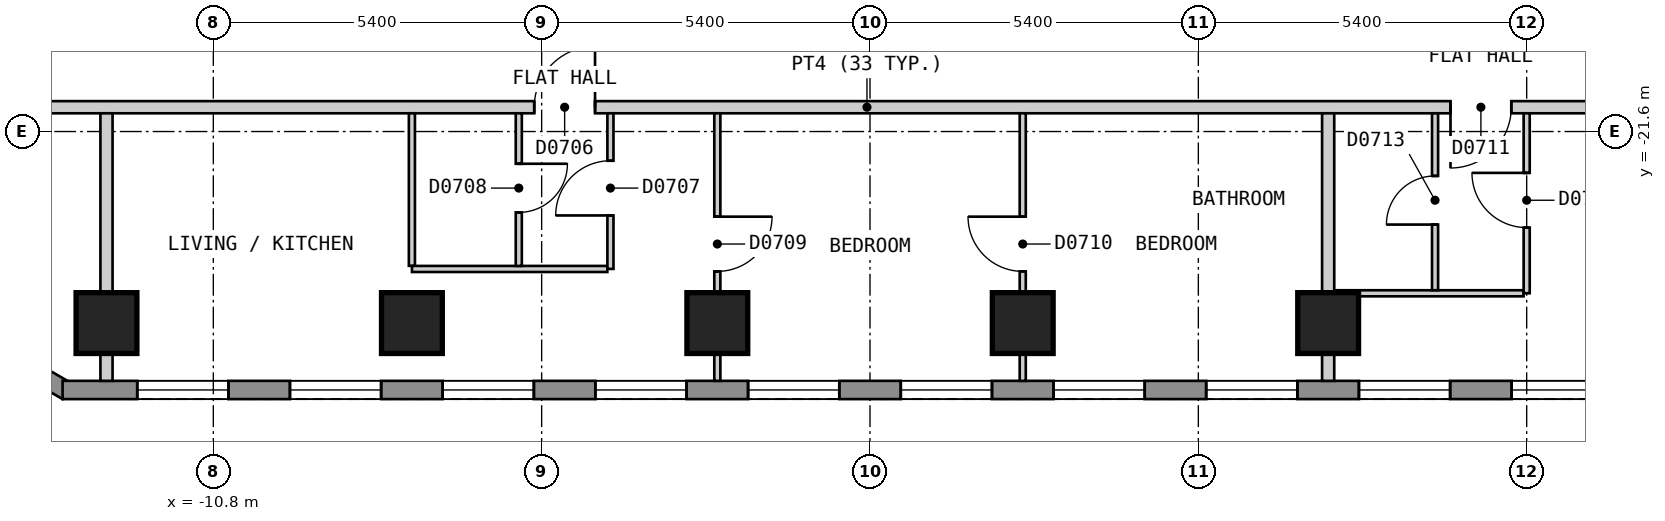
"""IFC4 building model, lengths in metres.
Left out: names, types, materials, properties, quantities, classifications, styles, units other than length and angle.
Written with IfcOpenShell. Run it as: python <this file> out.ifc"""

import sys

from ifc_helpers import new_model, si_unit, direction, frame, frame_2d, origin, origin_2d, place, context, subcontext, project, spatial, polyline, rectangle, outline, extrude, element, fill, save


model = new_model("IFC4")
c1 = context("Model", 3, precision=1e-05, world=origin(), true_north=direction((0.0, 1.0)))
c2 = subcontext(c1, "Body", "Model", "MODEL_VIEW")
j1 = project(units=[si_unit("LENGTHUNIT", "METRE"), si_unit("PLANEANGLEUNIT", "RADIAN")], contexts=[c1])
p1 = place(None, origin())
s1 = spatial("IfcSite", under=j1, at=p1, CompositionType="ELEMENT")
p2 = place(p1, origin())
s2 = spatial("IfcBuilding", under=s1, at=p2, CompositionType="ELEMENT")
p3 = place(p2, frame((0.0, 0.0, 105.0)))
s3 = spatial("IfcBuildingStorey", under=s2, at=p3, CompositionType="ELEMENT", Elevation=105.0)
for number, where, z_axis, x_axis in (
    (1, (-12.557, -24.75, 0.0), (0.0, 0.0, 1.0), (1.0, 0.0, 0.0)),
    (2, (-7.534, -24.75, 0.0), (0.0, 0.0, 1.0), (1.0, 0.0, 0.0)),
    (3, (-2.511, -24.75, 0.0), (0.0, 0.0, 1.0), (1.0, 0.0, 0.0)),
    (4, (2.512, -24.75, 0.0), (0.0, 0.0, 1.0), (1.0, 0.0, 0.0)),
    (5, (7.535, -24.75, 0.0), (0.0, 0.0, 1.0), (1.0, 0.0, 0.0)),
):
    element("IfcColumn", number, at=place(p3, frame(where, z_axis=z_axis, x_axis=x_axis)), inside=s3, PredefinedType="COLUMN", context=c2, shape_type="SweptSolid", body=[
        extrude(rectangle(XDim=1.0, YDim=1.0, at=origin_2d()), origin(), (0.0, 0.0, 1.0), 3.0),
    ])
p4 = place(p3, frame((-17.534, -23.37, 0.0), z_axis=(0.0, 0.0, 1.0), x_axis=(0.866010750942, -0.50002537861, 0.0)))
e6 = element("IfcWall", 6, at=p4, inside=s3, PredefinedType="SOLIDWALL", context=c2, shape_type="SweptSolid", body=[
    extrude(outline(polyline([(0.0, -0.15), (5.0, -0.15), (4.919, 0.15), (0.08, 0.15), (0.0, -0.15)])), origin(), (0.0, 0.0, 1.0), 2.6),
])
p5 = place(p4, frame((0.65, 0.0, 0.15)))
e7 = element("IfcOpeningElement", 7, at=p5, cuts=e6, PredefinedType="OPENING", context=c2, shape_type="SweptSolid", body=[
    extrude(rectangle(XDim=1.2, YDim=2.1, at=frame_2d((0.6, 1.05))), frame((0.0, 0.16, 0.0), z_axis=(0.0, -1.0, 0.0), x_axis=(1.0, 0.0, 0.0)), (0.0, 0.0, 1.0), 0.32),
])
p6 = place(p4, frame((3.15, 0.0, 0.15)))
e8 = element("IfcOpeningElement", 8, at=p6, cuts=e6, PredefinedType="OPENING", context=c2, shape_type="SweptSolid", body=[
    extrude(rectangle(XDim=1.2, YDim=2.1, at=frame_2d((0.6, 1.05))), frame((0.0, 0.16, 0.0), z_axis=(0.0, -1.0, 0.0), x_axis=(1.0, 0.0, 0.0)), (0.0, 0.0, 1.0), 0.32),
])
p7 = place(p3, frame((-13.279, -25.85, 0.0), z_axis=(0.0, 0.0, 1.0), x_axis=(1.0, 0.0, 0.0)))
e9 = element("IfcWall", 9, at=p7, inside=s3, PredefinedType="SOLIDWALL", context=c2, shape_type="SweptSolid", body=[
    extrude(outline(polyline([(0.0, -0.15), (26.558, -0.15), (26.478, 0.15), (0.08, 0.15), (0.0, -0.15)])), origin(), (0.0, 0.0, 1.0), 2.6),
])
p8 = place(p7, frame((1.228, 0.0, 0.15)))
e10 = element("IfcOpeningElement", 10, at=p8, cuts=e9, PredefinedType="OPENING", context=c2, shape_type="SweptSolid", body=[
    extrude(rectangle(XDim=1.5, YDim=2.1, at=frame_2d((0.75, 1.05))), frame((0.0, 0.16, 0.0), z_axis=(0.0, -1.0, 0.0), x_axis=(1.0, 0.0, 0.0)), (0.0, 0.0, 1.0), 0.32),
])
p9 = place(p7, frame((3.739, 0.0, 0.15)))
e11 = element("IfcOpeningElement", 11, at=p9, cuts=e9, PredefinedType="OPENING", context=c2, shape_type="SweptSolid", body=[
    extrude(rectangle(XDim=1.5, YDim=2.1, at=frame_2d((0.75, 1.05))), frame((0.0, 0.16, 0.0), z_axis=(0.0, -1.0, 0.0), x_axis=(1.0, 0.0, 0.0)), (0.0, 0.0, 1.0), 0.32),
])
p10 = place(p7, frame((6.251, 0.0, 0.15)))
e12 = element("IfcOpeningElement", 12, at=p10, cuts=e9, PredefinedType="OPENING", context=c2, shape_type="SweptSolid", body=[
    extrude(rectangle(XDim=1.5, YDim=2.1, at=frame_2d((0.75, 1.05))), frame((0.0, 0.16, 0.0), z_axis=(0.0, -1.0, 0.0), x_axis=(1.0, 0.0, 0.0)), (0.0, 0.0, 1.0), 0.32),
])
p11 = place(p7, frame((8.762, 0.0, 0.15)))
e13 = element("IfcOpeningElement", 13, at=p11, cuts=e9, PredefinedType="OPENING", context=c2, shape_type="SweptSolid", body=[
    extrude(rectangle(XDim=1.5, YDim=2.1, at=frame_2d((0.75, 1.05))), frame((0.0, 0.16, 0.0), z_axis=(0.0, -1.0, 0.0), x_axis=(1.0, 0.0, 0.0)), (0.0, 0.0, 1.0), 0.32),
])
p12 = place(p7, frame((11.274, 0.0, 0.15)))
e14 = element("IfcOpeningElement", 14, at=p12, cuts=e9, PredefinedType="OPENING", context=c2, shape_type="SweptSolid", body=[
    extrude(rectangle(XDim=1.5, YDim=2.1, at=frame_2d((0.75, 1.05))), frame((0.0, 0.16, 0.0), z_axis=(0.0, -1.0, 0.0), x_axis=(1.0, 0.0, 0.0)), (0.0, 0.0, 1.0), 0.32),
])
p13 = place(p7, frame((13.785, 0.0, 0.15)))
e15 = element("IfcOpeningElement", 15, at=p13, cuts=e9, PredefinedType="OPENING", context=c2, shape_type="SweptSolid", body=[
    extrude(rectangle(XDim=1.5, YDim=2.1, at=frame_2d((0.75, 1.05))), frame((0.0, 0.16, 0.0), z_axis=(0.0, -1.0, 0.0), x_axis=(1.0, 0.0, 0.0)), (0.0, 0.0, 1.0), 0.32),
])
p14 = place(p7, frame((16.297, 0.0, 0.15)))
e16 = element("IfcOpeningElement", 16, at=p14, cuts=e9, PredefinedType="OPENING", context=c2, shape_type="SweptSolid", body=[
    extrude(rectangle(XDim=1.5, YDim=2.1, at=frame_2d((0.75, 1.05))), frame((0.0, 0.16, 0.0), z_axis=(0.0, -1.0, 0.0), x_axis=(1.0, 0.0, 0.0)), (0.0, 0.0, 1.0), 0.32),
])
p15 = place(p7, frame((18.808, 0.0, 0.15)))
e17 = element("IfcOpeningElement", 17, at=p15, cuts=e9, PredefinedType="OPENING", context=c2, shape_type="SweptSolid", body=[
    extrude(rectangle(XDim=1.5, YDim=2.1, at=frame_2d((0.75, 1.05))), frame((0.0, 0.16, 0.0), z_axis=(0.0, -1.0, 0.0), x_axis=(1.0, 0.0, 0.0)), (0.0, 0.0, 1.0), 0.32),
])
p16 = place(p7, frame((21.32, 0.0, 0.15)))
e18 = element("IfcOpeningElement", 18, at=p16, cuts=e9, PredefinedType="OPENING", context=c2, shape_type="SweptSolid", body=[
    extrude(rectangle(XDim=1.5, YDim=2.1, at=frame_2d((0.75, 1.05))), frame((0.0, 0.16, 0.0), z_axis=(0.0, -1.0, 0.0), x_axis=(1.0, 0.0, 0.0)), (0.0, 0.0, 1.0), 0.32),
])
p17 = place(p7, frame((23.831, 0.0, 0.15)))
e19 = element("IfcOpeningElement", 19, at=p17, cuts=e9, PredefinedType="OPENING", context=c2, shape_type="SweptSolid", body=[
    extrude(rectangle(XDim=1.5, YDim=2.1, at=frame_2d((0.75, 1.05))), frame((0.0, 0.16, 0.0), z_axis=(0.0, -1.0, 0.0), x_axis=(1.0, 0.0, 0.0)), (0.0, 0.0, 1.0), 0.32),
])
p18 = place(p3, frame((-15.499, -21.2, 0.0), z_axis=(0.0, 0.0, 1.0), x_axis=(1.0, 0.0, 0.0)))
e20 = element("IfcWall", 20, at=p18, inside=s3, PredefinedType="PARTITIONING", context=c2, shape_type="SweptSolid", body=[
    extrude(rectangle(XDim=30.898, YDim=0.2, at=frame_2d((15.449, 0.0))), origin(), (0.0, 0.0, 1.0), 2.6),
])
p19 = place(p18, frame((9.977, 0.0, 0.0)))
e21 = element("IfcOpeningElement", 21, at=p19, cuts=e20, PredefinedType="OPENING", context=c2, shape_type="SweptSolid", body=[
    extrude(rectangle(XDim=1.0, YDim=2.1, at=frame_2d((0.5, 1.05))), frame((0.0, 0.11, 0.0), z_axis=(0.0, -1.0, 0.0), x_axis=(1.0, 0.0, 0.0)), (0.0, 0.0, 1.0), 0.22),
])
p20 = place(p18, frame((25.046, 0.0, 0.0)))
e22 = element("IfcOpeningElement", 22, at=p20, cuts=e20, PredefinedType="OPENING", context=c2, shape_type="SweptSolid", body=[
    extrude(rectangle(XDim=1.0, YDim=2.1, at=frame_2d((0.5, 1.05))), frame((0.0, 0.11, 0.0), z_axis=(0.0, -1.0, 0.0), x_axis=(1.0, 0.0, 0.0)), (0.0, 0.0, 1.0), 0.22),
])
p21 = place(p3, frame((-7.534, -21.3, 0.0), z_axis=(0.0, 0.0, 1.0), x_axis=(0.0, -1.0, 0.0)))
e23 = element("IfcWall", 23, at=p21, inside=s3, PredefinedType="PARTITIONING", context=c2, shape_type="SweptSolid", body=[
    extrude(rectangle(XDim=2.509, YDim=0.1, at=frame_2d((1.254, 0.0))), origin(), (0.0, 0.0, 1.0), 2.6),
])
p22 = place(p3, frame((-2.511, -21.3, 0.0), z_axis=(0.0, 0.0, 1.0), x_axis=(0.0, -1.0, 0.0)))
e24 = element("IfcWall", 24, at=p22, inside=s3, PredefinedType="PARTITIONING", context=c2, shape_type="SweptSolid", body=[
    extrude(rectangle(XDim=4.4, YDim=0.1, at=frame_2d((2.2, 0.0))), origin(), (0.0, 0.0, 1.0), 2.6),
])
p23 = place(p22, frame((1.7, 0.0, 0.0)))
e25 = element("IfcOpeningElement", 25, at=p23, cuts=e24, PredefinedType="OPENING", context=c2, shape_type="SweptSolid", body=[
    extrude(rectangle(XDim=0.9, YDim=2.1, at=frame_2d((0.45, 1.05))), frame((0.0, 0.06, 0.0), z_axis=(0.0, -1.0, 0.0), x_axis=(1.0, 0.0, 0.0)), (0.0, 0.0, 1.0), 0.12),
])
p24 = place(p3, frame((-7.533, -23.86, 0.0), z_axis=(0.0, 0.0, 1.0), x_axis=(1.0, 0.0, 0.0)))
e26 = element("IfcWall", 26, at=p24, inside=s3, PredefinedType="PARTITIONING", context=c2, shape_type="SweptSolid", body=[
    extrude(rectangle(XDim=3.213, YDim=0.1, at=frame_2d((1.606, 0.0))), origin(), (0.0, 0.0, 1.0), 2.6),
])
p25 = place(p3, frame((7.635, -24.26, 0.0), z_axis=(0.0, 0.0, 1.0), x_axis=(1.0, 0.0, 0.0)))
e27 = element("IfcWall", 27, at=p25, inside=s3, PredefinedType="PARTITIONING", context=c2, shape_type="SweptSolid", body=[
    extrude(rectangle(XDim=3.114, YDim=0.1, at=frame_2d((1.557, 0.0))), origin(), (0.0, 0.0, 1.0), 2.6),
])
p26 = place(p3, frame((9.293, -24.21, 0.0), z_axis=(0.0, 0.0, 1.0), x_axis=(0.0, 1.0, 0.0)))
e28 = element("IfcWall", 28, at=p26, inside=s3, PredefinedType="PARTITIONING", context=c2, shape_type="SweptSolid", body=[
    extrude(rectangle(XDim=2.91, YDim=0.1, at=frame_2d((1.455, 0.0))), origin(), (0.0, 0.0, 1.0), 2.6),
])
p27 = place(p26, frame((1.08, 0.0, 0.0)))
e29 = element("IfcOpeningElement", 29, at=p27, cuts=e28, PredefinedType="OPENING", context=c2, shape_type="SweptSolid", body=[
    extrude(rectangle(XDim=0.8, YDim=2.1, at=frame_2d((0.4, 1.05))), frame((0.0, 0.06, 0.0), z_axis=(0.0, -1.0, 0.0), x_axis=(1.0, 0.0, 0.0)), (0.0, 0.0, 1.0), 0.12),
])
p28 = place(p3, frame((10.8, -24.259, 0.0), z_axis=(0.0, 0.0, 1.0), x_axis=(0.0, 1.0, 0.0)))
e30 = element("IfcWall", 30, at=p28, inside=s3, PredefinedType="PARTITIONING", context=c2, shape_type="SweptSolid", body=[
    extrude(rectangle(XDim=2.959, YDim=0.1, at=frame_2d((1.479, 0.0))), origin(), (0.0, 0.0, 1.0), 2.6),
])
p29 = place(p28, frame((1.079, 0.0, 0.0)))
e31 = element("IfcOpeningElement", 31, at=p29, cuts=e30, PredefinedType="OPENING", context=c2, shape_type="SweptSolid", body=[
    extrude(rectangle(XDim=0.9, YDim=2.1, at=frame_2d((0.45, 1.05))), frame((0.0, 0.06, 0.0), z_axis=(0.0, -1.0, 0.0), x_axis=(1.0, 0.0, 0.0)), (0.0, 0.0, 1.0), 0.12),
])
p30 = place(p3, frame((2.512, -25.7, 0.0), z_axis=(0.0, 0.0, 1.0), x_axis=(0.0, 1.0, 0.0)))
e32 = element("IfcWall", 32, at=p30, inside=s3, PredefinedType="PARTITIONING", context=c2, shape_type="SweptSolid", body=[
    extrude(rectangle(XDim=4.4, YDim=0.1, at=frame_2d((2.2, 0.0))), origin(), (0.0, 0.0, 1.0), 2.6),
])
p31 = place(p30, frame((1.8, 0.0, 0.0)))
e33 = element("IfcOpeningElement", 33, at=p31, cuts=e32, PredefinedType="OPENING", context=c2, shape_type="SweptSolid", body=[
    extrude(rectangle(XDim=0.9, YDim=2.1, at=frame_2d((0.45, 1.05))), frame((0.0, 0.06, 0.0), z_axis=(0.0, -1.0, 0.0), x_axis=(1.0, 0.0, 0.0)), (0.0, 0.0, 1.0), 0.12),
])
p32 = place(p3, frame((-4.269, -23.859, 0.0), z_axis=(0.0, 0.0, 1.0), x_axis=(0.0, 1.0, 0.0)))
e34 = element("IfcWall", 34, at=p32, inside=s3, PredefinedType="PARTITIONING", context=c2, shape_type="SweptSolid", body=[
    extrude(rectangle(XDim=2.559, YDim=0.1, at=frame_2d((1.279, 0.0))), origin(), (0.0, 0.0, 1.0), 2.6),
])
p33 = place(p32, frame((0.879, 0.0, 0.0)))
e35 = element("IfcOpeningElement", 35, at=p33, cuts=e34, PredefinedType="OPENING", context=c2, shape_type="SweptSolid", body=[
    extrude(rectangle(XDim=0.9, YDim=2.1, at=frame_2d((0.45, 1.05))), frame((0.0, 0.06, 0.0), z_axis=(0.0, -1.0, 0.0), x_axis=(1.0, 0.0, 0.0)), (0.0, 0.0, 1.0), 0.12),
])
p34 = place(p3, frame((-5.776, -23.81, 0.0), z_axis=(0.0, 0.0, 1.0), x_axis=(0.0, 1.0, 0.0)))
e36 = element("IfcWall", 36, at=p34, inside=s3, PredefinedType="PARTITIONING", context=c2, shape_type="SweptSolid", body=[
    extrude(rectangle(XDim=2.51, YDim=0.1, at=frame_2d((1.255, 0.0))), origin(), (0.0, 0.0, 1.0), 2.6),
])
p35 = place(p34, frame((0.88, 0.0, 0.0)))
e37 = element("IfcOpeningElement", 37, at=p35, cuts=e36, PredefinedType="OPENING", context=c2, shape_type="SweptSolid", body=[
    extrude(rectangle(XDim=0.8, YDim=2.1, at=frame_2d((0.4, 1.05))), frame((0.0, 0.06, 0.0), z_axis=(0.0, -1.0, 0.0), x_axis=(1.0, 0.0, 0.0)), (0.0, 0.0, 1.0), 0.12),
])
p36 = place(p3, frame((7.535, -21.3, 0.0), z_axis=(0.0, 0.0, 1.0), x_axis=(0.0, -1.0, 0.0)))
e38 = element("IfcWall", 38, at=p36, inside=s3, PredefinedType="PARTITIONING", context=c2, shape_type="SweptSolid", body=[
    extrude(rectangle(XDim=2.98, YDim=0.2, at=frame_2d((1.49, 0.0))), origin(), (0.0, 0.0, 1.0), 2.6),
])
p37 = place(p3, frame((7.535, -25.7, 0.0), z_axis=(0.0, 0.0, 1.0), x_axis=(0.0, 1.0, 0.0)))
e39 = element("IfcWall", 39, at=p37, inside=s3, PredefinedType="PARTITIONING", context=c2, shape_type="SweptSolid", body=[
    extrude(rectangle(XDim=1.46, YDim=0.2, at=frame_2d((0.73, 0.0))), origin(), (0.0, 0.0, 1.0), 2.6),
])
p38 = place(p3, frame((-12.557, -25.7, 0.0), z_axis=(0.0, 0.0, 1.0), x_axis=(0.0, 1.0, 0.0)))
e40 = element("IfcWall", 40, at=p38, inside=s3, PredefinedType="PARTITIONING", context=c2, shape_type="SweptSolid", body=[
    extrude(rectangle(XDim=4.4, YDim=0.2, at=frame_2d((2.2, 0.0))), origin(), (0.0, 0.0, 1.0), 2.6),
])
p39 = place(p8, origin())
e41 = element("IfcWindow", 41, at=p39, inside=s3, PartitioningType="SINGLE_PANEL", PredefinedType="WINDOW", context=c2, shape_type="SweptSolid", body=[
    extrude(rectangle(XDim=1.5, YDim=2.1, at=frame_2d((0.75, 1.05))), frame((0.0, 0.03, 0.0), z_axis=(0.0, -1.0, 0.0), x_axis=(1.0, 0.0, 0.0)), (0.0, 0.0, 1.0), 0.06),
])
fill(e10, e41)
p40 = place(p9, origin())
e42 = element("IfcWindow", 42, at=p40, inside=s3, PartitioningType="SINGLE_PANEL", PredefinedType="WINDOW", context=c2, shape_type="SweptSolid", body=[
    extrude(rectangle(XDim=1.5, YDim=2.1, at=frame_2d((0.75, 1.05))), frame((0.0, 0.03, 0.0), z_axis=(0.0, -1.0, 0.0), x_axis=(1.0, 0.0, 0.0)), (0.0, 0.0, 1.0), 0.06),
])
fill(e11, e42)
p41 = place(p10, origin())
e43 = element("IfcWindow", 43, at=p41, inside=s3, PartitioningType="SINGLE_PANEL", PredefinedType="WINDOW", context=c2, shape_type="SweptSolid", body=[
    extrude(rectangle(XDim=1.5, YDim=2.1, at=frame_2d((0.75, 1.05))), frame((0.0, 0.03, 0.0), z_axis=(0.0, -1.0, 0.0), x_axis=(1.0, 0.0, 0.0)), (0.0, 0.0, 1.0), 0.06),
])
fill(e12, e43)
p42 = place(p11, origin())
e44 = element("IfcWindow", 44, at=p42, inside=s3, PartitioningType="SINGLE_PANEL", PredefinedType="WINDOW", context=c2, shape_type="SweptSolid", body=[
    extrude(rectangle(XDim=1.5, YDim=2.1, at=frame_2d((0.75, 1.05))), frame((0.0, 0.03, 0.0), z_axis=(0.0, -1.0, 0.0), x_axis=(1.0, 0.0, 0.0)), (0.0, 0.0, 1.0), 0.06),
])
fill(e13, e44)
p43 = place(p12, origin())
e45 = element("IfcWindow", 45, at=p43, inside=s3, PartitioningType="SINGLE_PANEL", PredefinedType="WINDOW", context=c2, shape_type="SweptSolid", body=[
    extrude(rectangle(XDim=1.5, YDim=2.1, at=frame_2d((0.75, 1.05))), frame((0.0, 0.03, 0.0), z_axis=(0.0, -1.0, 0.0), x_axis=(1.0, 0.0, 0.0)), (0.0, 0.0, 1.0), 0.06),
])
fill(e14, e45)
p44 = place(p13, origin())
e46 = element("IfcWindow", 46, at=p44, inside=s3, PartitioningType="SINGLE_PANEL", PredefinedType="WINDOW", context=c2, shape_type="SweptSolid", body=[
    extrude(rectangle(XDim=1.5, YDim=2.1, at=frame_2d((0.75, 1.05))), frame((0.0, 0.03, 0.0), z_axis=(0.0, -1.0, 0.0), x_axis=(1.0, 0.0, 0.0)), (0.0, 0.0, 1.0), 0.06),
])
fill(e15, e46)
p45 = place(p14, origin())
e47 = element("IfcWindow", 47, at=p45, inside=s3, PartitioningType="SINGLE_PANEL", PredefinedType="WINDOW", context=c2, shape_type="SweptSolid", body=[
    extrude(rectangle(XDim=1.5, YDim=2.1, at=frame_2d((0.75, 1.05))), frame((0.0, 0.03, 0.0), z_axis=(0.0, -1.0, 0.0), x_axis=(1.0, 0.0, 0.0)), (0.0, 0.0, 1.0), 0.06),
])
fill(e16, e47)
p46 = place(p15, origin())
e48 = element("IfcWindow", 48, at=p46, inside=s3, PartitioningType="SINGLE_PANEL", PredefinedType="WINDOW", context=c2, shape_type="SweptSolid", body=[
    extrude(rectangle(XDim=1.5, YDim=2.1, at=frame_2d((0.75, 1.05))), frame((0.0, 0.03, 0.0), z_axis=(0.0, -1.0, 0.0), x_axis=(1.0, 0.0, 0.0)), (0.0, 0.0, 1.0), 0.06),
])
fill(e17, e48)
p47 = place(p16, origin())
e49 = element("IfcWindow", 49, at=p47, inside=s3, PartitioningType="SINGLE_PANEL", PredefinedType="WINDOW", context=c2, shape_type="SweptSolid", body=[
    extrude(rectangle(XDim=1.5, YDim=2.1, at=frame_2d((0.75, 1.05))), frame((0.0, 0.03, 0.0), z_axis=(0.0, -1.0, 0.0), x_axis=(1.0, 0.0, 0.0)), (0.0, 0.0, 1.0), 0.06),
])
fill(e18, e49)
p48 = place(p17, origin())
e50 = element("IfcWindow", 50, at=p48, inside=s3, PartitioningType="SINGLE_PANEL", PredefinedType="WINDOW", context=c2, shape_type="SweptSolid", body=[
    extrude(rectangle(XDim=1.5, YDim=2.1, at=frame_2d((0.75, 1.05))), frame((0.0, 0.03, 0.0), z_axis=(0.0, -1.0, 0.0), x_axis=(1.0, 0.0, 0.0)), (0.0, 0.0, 1.0), 0.06),
])
fill(e19, e50)
p49 = place(p19, origin())
e51 = element("IfcDoor", 51, at=p49, inside=s3, OperationType="SINGLE_SWING_RIGHT", PredefinedType="DOOR", context=c2, shape_type="SweptSolid", body=[
    extrude(rectangle(XDim=1.0, YDim=2.1, at=frame_2d((0.5, 1.05))), frame((0.0, 0.025, 0.0), z_axis=(0.0, -1.0, 0.0), x_axis=(1.0, 0.0, 0.0)), (0.0, 0.0, 1.0), 0.05),
])
fill(e21, e51)
p50 = place(p33, origin())
e52 = element("IfcDoor", 52, at=p50, inside=s3, OperationType="SINGLE_SWING_LEFT", PredefinedType="DOOR", context=c2, shape_type="SweptSolid", body=[
    extrude(rectangle(XDim=0.9, YDim=2.1, at=frame_2d((0.45, 1.05))), frame((0.0, 0.025, 0.0), z_axis=(0.0, -1.0, 0.0), x_axis=(1.0, 0.0, 0.0)), (0.0, 0.0, 1.0), 0.05),
])
fill(e35, e52)
p51 = place(p35, origin())
e53 = element("IfcDoor", 53, at=p51, inside=s3, OperationType="SINGLE_SWING_RIGHT", PredefinedType="DOOR", context=c2, shape_type="SweptSolid", body=[
    extrude(rectangle(XDim=0.8, YDim=2.1, at=frame_2d((0.4, 1.05))), frame((0.0, 0.025, 0.0), z_axis=(0.0, -1.0, 0.0), x_axis=(1.0, 0.0, 0.0)), (0.0, 0.0, 1.0), 0.05),
])
fill(e37, e53)
p52 = place(p23, origin())
e54 = element("IfcDoor", 54, at=p52, inside=s3, OperationType="SINGLE_SWING_LEFT", PredefinedType="DOOR", context=c2, shape_type="SweptSolid", body=[
    extrude(rectangle(XDim=0.9, YDim=2.1, at=frame_2d((0.45, 1.05))), frame((0.0, 0.025, 0.0), z_axis=(0.0, -1.0, 0.0), x_axis=(1.0, 0.0, 0.0)), (0.0, 0.0, 1.0), 0.05),
])
fill(e25, e54)
p53 = place(p31, origin())
e55 = element("IfcDoor", 55, at=p53, inside=s3, OperationType="SINGLE_SWING_RIGHT", PredefinedType="DOOR", context=c2, shape_type="SweptSolid", body=[
    extrude(rectangle(XDim=0.9, YDim=2.1, at=frame_2d((0.45, 1.05))), frame((0.0, 0.025, 0.0), z_axis=(0.0, -1.0, 0.0), x_axis=(1.0, 0.0, 0.0)), (0.0, 0.0, 1.0), 0.05),
])
fill(e33, e55)
p54 = place(p20, origin())
e56 = element("IfcDoor", 56, at=p54, inside=s3, OperationType="SINGLE_SWING_LEFT", PredefinedType="DOOR", context=c2, shape_type="SweptSolid", body=[
    extrude(rectangle(XDim=1.0, YDim=2.1, at=frame_2d((0.5, 1.05))), frame((0.0, 0.025, 0.0), z_axis=(0.0, -1.0, 0.0), x_axis=(1.0, 0.0, 0.0)), (0.0, 0.0, 1.0), 0.05),
])
fill(e22, e56)
p55 = place(p29, origin())
e57 = element("IfcDoor", 57, at=p55, inside=s3, OperationType="SINGLE_SWING_RIGHT", PredefinedType="DOOR", context=c2, shape_type="SweptSolid", body=[
    extrude(rectangle(XDim=0.9, YDim=2.1, at=frame_2d((0.45, 1.05))), frame((0.0, 0.025, 0.0), z_axis=(0.0, -1.0, 0.0), x_axis=(1.0, 0.0, 0.0)), (0.0, 0.0, 1.0), 0.05),
])
fill(e31, e57)
p56 = place(p27, origin())
e58 = element("IfcDoor", 58, at=p56, inside=s3, OperationType="SINGLE_SWING_LEFT", PredefinedType="DOOR", context=c2, shape_type="SweptSolid", body=[
    extrude(rectangle(XDim=0.8, YDim=2.1, at=frame_2d((0.4, 1.05))), frame((0.0, 0.025, 0.0), z_axis=(0.0, -1.0, 0.0), x_axis=(1.0, 0.0, 0.0)), (0.0, 0.0, 1.0), 0.05),
])
fill(e29, e58)
save(model, sys.argv[1])
